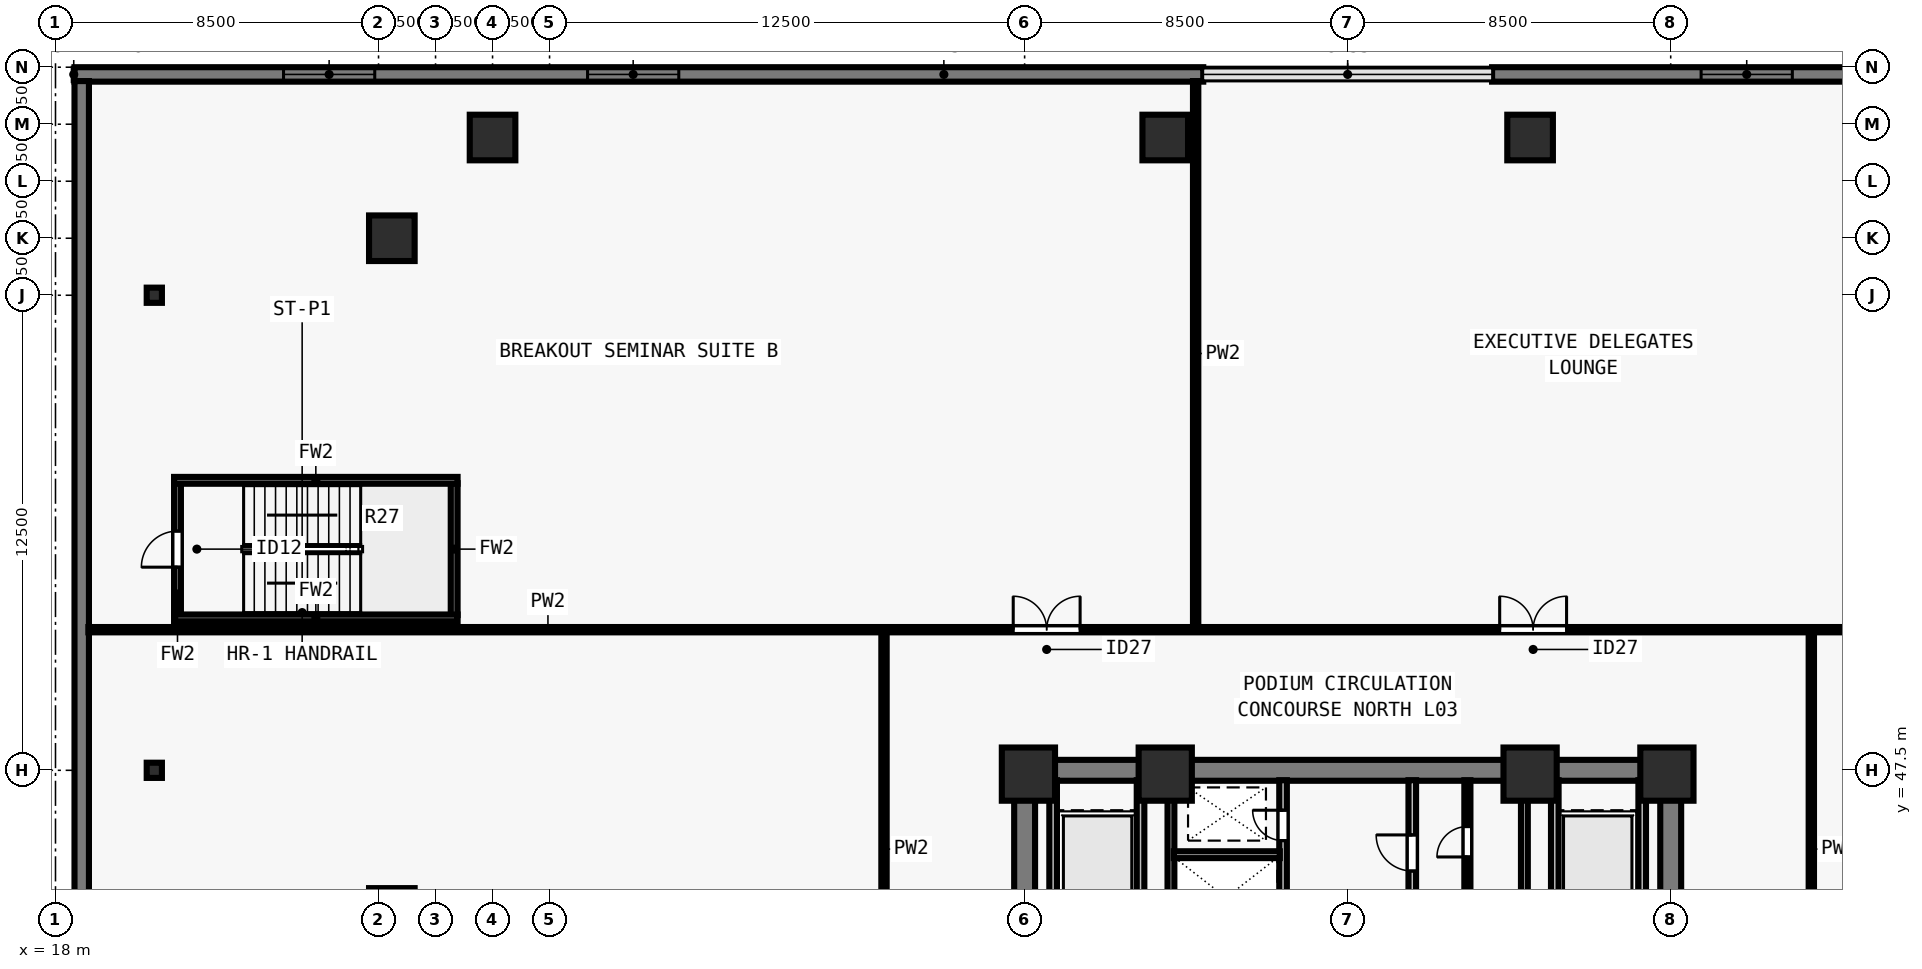
"""IFC4 building model, lengths in metres.
Left out: names, types, materials, properties, quantities, classifications, styles, units other than length and angle.
Written with IfcOpenShell. Run it as: python <this file> out.ifc"""

import sys

from ifc_helpers import new_model, si_unit, direction, frame, frame_2d, origin, origin_2d, place, context, subcontext, project, spatial, rectangle, i_section, extrude, element, fill, save


model = new_model("IFC4")
c1 = context("Model", 3, precision=1e-05, world=origin(), true_north=direction((0.0, 1.0)))
c2 = subcontext(c1, "Body", "Model", "MODEL_VIEW")
j1 = project(units=[si_unit("LENGTHUNIT", "METRE"), si_unit("PLANEANGLEUNIT", "RADIAN")], contexts=[c1])
p1 = place(None, origin())
s1 = spatial("IfcSite", under=j1, at=p1, CompositionType="ELEMENT")
p2 = place(p1, origin())
s2 = spatial("IfcBuilding", under=s1, at=p2, CompositionType="ELEMENT")
p3 = place(p2, frame((0.0, 0.0, 14.5)))
s3 = spatial("IfcBuildingStorey", under=s2, at=p3, CompositionType="ELEMENT", Elevation=14.5)
for number, where, z_axis, x_axis in (
    (1, (43.6, 47.4, 0.0), (0.0, 0.0, 1.0), (1.0, 0.0, 0.0)),
    (2, (47.2, 47.4, 0.0), (0.0, 0.0, 1.0), (1.0, 0.0, 0.0)),
    (3, (56.8, 47.4, 0.0), (0.0, 0.0, 1.0), (1.0, 0.0, 0.0)),
    (4, (60.4, 47.4, 0.0), (0.0, 0.0, 1.0), (1.0, 0.0, 0.0)),
):
    element("IfcColumn", number, at=place(p3, frame(where, z_axis=z_axis, x_axis=x_axis)), inside=s3, PredefinedType="COLUMN", context=c2, shape_type="SweptSolid", body=[
        extrude(rectangle(XDim=1.4, YDim=1.4, at=origin_2d()), origin(), (0.0, 0.0, 1.0), 4.5),
    ])
for number, where, z_axis, x_axis in (
    (5, (56.8, 64.15, 0.0), (0.0, 0.0, 1.0), (1.0, 0.0, 0.0)),
    (6, (47.2, 64.15, 0.0), (0.0, 0.0, 1.0), (1.0, 0.0, 0.0)),
    (7, (29.5, 64.15, 0.0), (0.0, 0.0, 1.0), (1.0, 0.0, 0.0)),
    (8, (26.85, 61.5, 0.0), (0.0, 0.0, 1.0), (1.0, 0.0, 0.0)),
    (9, (26.85, 43.8, 0.0), (0.0, 0.0, 1.0), (1.0, 0.0, 0.0)),
):
    element("IfcColumn", number, at=place(p3, frame(where, z_axis=z_axis, x_axis=x_axis)), inside=s3, PredefinedType="COLUMN", context=c2, shape_type="SweptSolid", body=[
        extrude(rectangle(XDim=1.2, YDim=1.2, at=origin_2d()), origin(), (0.0, 0.0, 1.0), 4.5),
    ])
for number, where, z_axis, x_axis in (
    (10, (20.6, 47.5, 0.0), (0.0, 0.0, 1.0), (1.0, 0.0, 0.0)),
    (11, (20.6, 60.0, 0.0), (0.0, 0.0, 1.0), (1.0, 0.0, 0.0)),
):
    element("IfcColumn", number, at=place(p3, frame(where, z_axis=z_axis, x_axis=x_axis)), inside=s3, PredefinedType="COLUMN", context=c2, shape_type="SweptSolid", body=[
        extrude(i_section(OverallWidth=0.4, OverallDepth=0.4, WebThickness=0.028, FlangeThickness=0.045, at=origin_2d()), origin(), (0.0, 0.0, 1.0), 4.5),
    ])
p4 = place(p3, frame((18.5, 65.81, 0.0), z_axis=(0.0, 0.0, 1.0), x_axis=(1.0, 0.0, 0.0)))
e12 = element("IfcWall", 12, at=p4, inside=s3, PredefinedType="SOLIDWALL", context=c2, shape_type="SweptSolid", body=[
    extrude(rectangle(XDim=29.7, YDim=0.38, at=frame_2d((14.85, 0.0))), origin(), (0.0, 0.0, 1.0), 4.15),
])
p5 = place(p4, frame((5.5, 0.0, 0.8)))
e13 = element("IfcOpeningElement", 13, at=p5, cuts=e12, PredefinedType="OPENING", context=c2, shape_type="SweptSolid", body=[
    extrude(rectangle(XDim=2.4, YDim=1.6, at=frame_2d((1.2, 0.8))), frame((0.0, 0.2, 0.0), z_axis=(0.0, -1.0, 0.0), x_axis=(1.0, 0.0, 0.0)), (0.0, 0.0, 1.0), 0.4),
])
p6 = place(p4, frame((13.5, 0.0, 0.8)))
e14 = element("IfcOpeningElement", 14, at=p6, cuts=e12, PredefinedType="OPENING", context=c2, shape_type="SweptSolid", body=[
    extrude(rectangle(XDim=2.4, YDim=1.6, at=frame_2d((1.2, 0.8))), frame((0.0, 0.2, 0.0), z_axis=(0.0, -1.0, 0.0), x_axis=(1.0, 0.0, 0.0)), (0.0, 0.0, 1.0), 0.4),
])
p7 = place(p3, frame((55.8, 65.81, 0.0), z_axis=(0.0, 0.0, 1.0), x_axis=(1.0, 0.0, 0.0)))
e15 = element("IfcWall", 15, at=p7, inside=s3, PredefinedType="SOLIDWALL", context=c2, shape_type="SweptSolid", body=[
    extrude(rectangle(XDim=29.7, YDim=0.38, at=frame_2d((14.85, 0.0))), origin(), (0.0, 0.0, 1.0), 4.15),
])
p8 = place(p7, frame((5.5, 0.0, 0.8)))
e16 = element("IfcOpeningElement", 16, at=p8, cuts=e15, PredefinedType="OPENING", context=c2, shape_type="SweptSolid", body=[
    extrude(rectangle(XDim=2.4, YDim=1.6, at=frame_2d((1.2, 0.8))), frame((0.0, 0.2, 0.0), z_axis=(0.0, -1.0, 0.0), x_axis=(1.0, 0.0, 0.0)), (0.0, 0.0, 1.0), 0.4),
])
p9 = place(p7, frame((13.5, 0.0, 0.8)))
e17 = element("IfcOpeningElement", 17, at=p9, cuts=e15, PredefinedType="OPENING", context=c2, shape_type="SweptSolid", body=[
    extrude(rectangle(XDim=2.4, YDim=1.6, at=frame_2d((1.2, 0.8))), frame((0.0, 0.2, 0.0), z_axis=(0.0, -1.0, 0.0), x_axis=(1.0, 0.0, 0.0)), (0.0, 0.0, 1.0), 0.4),
])
p10 = place(p3, frame((18.69, 12.365, 0.0), z_axis=(0.0, 0.0, 1.0), x_axis=(0.0, 1.0, 0.0)))
e18 = element("IfcWall", 18, at=p10, inside=s3, PredefinedType="SOLIDWALL", context=c2, shape_type="SweptSolid", body=[
    extrude(rectangle(XDim=53.27, YDim=0.38, at=frame_2d((26.635, 0.0))), origin(), (0.0, 0.0, 1.0), 4.15),
])
p11 = place(p3, frame((43.225, 47.5, 0.0), z_axis=(0.0, 0.0, 1.0), x_axis=(1.0, 0.0, 0.0)))
e19 = element("IfcWall", 19, at=p11, inside=s3, PredefinedType="SHEAR", context=c2, shape_type="SweptSolid", body=[
    extrude(rectangle(XDim=17.55, YDim=0.55, at=frame_2d((8.775, 0.0))), origin(), (0.0, 0.0, 1.0), 4.15),
])
for number, where, z_axis, x_axis in (
    (20, (43.5, 40.8, 0.0), (0.0, 0.0, 1.0), (0.0, 1.0, 0.0)),
    (21, (60.5, 40.8, 0.0), (0.0, 0.0, 1.0), (0.0, 1.0, 0.0)),
):
    element("IfcWall", number, at=place(p3, frame(where, z_axis=z_axis, x_axis=x_axis)), inside=s3, PredefinedType="SHEAR", context=c2, shape_type="SweptSolid", body=[
        extrude(rectangle(XDim=6.435, YDim=0.55, at=frame_2d((3.218, 0.0))), origin(), (0.0, 0.0, 1.0), 4.15),
    ])
p12 = place(p3, frame((50.3, 40.585, 0.0), z_axis=(0.0, 0.0, 1.0), x_axis=(0.0, 1.0, 0.0)))
e22 = element("IfcWall", 22, at=p12, inside=s3, PredefinedType="SOLIDWALL", context=c2, shape_type="SweptSolid", body=[
    extrude(rectangle(XDim=6.655, YDim=0.2, at=frame_2d((3.328, 0.0))), origin(), (0.0, 0.0, 1.0), 4.15),
])
p13 = place(p12, frame((5.065, 0.0, 0.0)))
e23 = element("IfcOpeningElement", 23, at=p13, cuts=e22, PredefinedType="OPENING", context=c2, shape_type="SweptSolid", body=[
    extrude(rectangle(XDim=0.8, YDim=2.08, at=frame_2d((0.4, 1.04))), frame((0.0, 0.11, 0.0), z_axis=(0.0, -1.0, 0.0), x_axis=(1.0, 0.0, 0.0)), (0.0, 0.0, 1.0), 0.22),
])
p14 = place(p3, frame((53.7, 40.585, 0.0), z_axis=(0.0, 0.0, 1.0), x_axis=(0.0, 1.0, 0.0)))
e24 = element("IfcWall", 24, at=p14, inside=s3, PredefinedType="SOLIDWALL", context=c2, shape_type="SweptSolid", body=[
    extrude(rectangle(XDim=6.655, YDim=0.2, at=frame_2d((3.328, 0.0))), origin(), (0.0, 0.0, 1.0), 4.15),
])
p15 = place(p14, frame((0.195, 0.0, 0.0)))
e25 = element("IfcOpeningElement", 25, at=p15, cuts=e24, PredefinedType="OPENING", context=c2, shape_type="SweptSolid", body=[
    extrude(rectangle(XDim=0.8, YDim=2.08, at=frame_2d((0.4, 1.04))), frame((0.0, 0.11, 0.0), z_axis=(0.0, -1.0, 0.0), x_axis=(1.0, 0.0, 0.0)), (0.0, 0.0, 1.0), 0.22),
])
p16 = place(p14, frame((4.265, 0.0, 0.0)))
e26 = element("IfcOpeningElement", 26, at=p16, cuts=e24, PredefinedType="OPENING", context=c2, shape_type="SweptSolid", body=[
    extrude(rectangle(XDim=0.95, YDim=2.12, at=frame_2d((0.475, 1.06))), frame((0.0, 0.11, 0.0), z_axis=(0.0, -1.0, 0.0), x_axis=(1.0, 0.0, 0.0)), (0.0, 0.0, 1.0), 0.22),
])
for number, where, z_axis, x_axis in (
    (27, (46.55, 43.735, 0.0), (0.0, 0.0, 1.0), (0.0, 1.0, 0.0)),
    (28, (44.25, 43.735, 0.0), (0.0, 0.0, 1.0), (0.0, 1.0, 0.0)),
    (29, (57.45, 43.735, 0.0), (0.0, 0.0, 1.0), (0.0, 1.0, 0.0)),
    (30, (59.75, 43.735, 0.0), (0.0, 0.0, 1.0), (0.0, 1.0, 0.0)),
):
    element("IfcWall", number, at=place(p3, frame(where, z_axis=z_axis, x_axis=x_axis)), inside=s3, PredefinedType="SOLIDWALL", context=c2, shape_type="SweptSolid", body=[
        extrude(rectangle(XDim=3.505, YDim=0.2, at=frame_2d((1.752, 0.0))), origin(), (0.0, 0.0, 1.0), 4.15),
    ])
p17 = place(p3, frame((47.35, 43.735, 0.0), z_axis=(0.0, 0.0, 1.0), x_axis=(0.0, 1.0, 0.0)))
e31 = element("IfcWall", 31, at=p17, inside=s3, PredefinedType="SOLIDWALL", context=c2, shape_type="SweptSolid", body=[
    extrude(rectangle(XDim=3.505, YDim=0.18, at=frame_2d((1.752, 0.0))), origin(), (0.0, 0.0, 1.0), 4.15),
])
p18 = place(p3, frame((47.425, 45.28, 0.0), z_axis=(0.0, 0.0, 1.0), x_axis=(1.0, 0.0, 0.0)))
e32 = element("IfcWall", 32, at=p18, inside=s3, PredefinedType="SOLIDWALL", context=c2, shape_type="SweptSolid", body=[
    extrude(rectangle(XDim=2.79, YDim=0.18, at=frame_2d((1.395, 0.0))), origin(), (0.0, 0.0, 1.0), 4.15),
])
p19 = place(p3, frame((56.65, 43.735, 0.0), z_axis=(0.0, 0.0, 1.0), x_axis=(0.0, 1.0, 0.0)))
e33 = element("IfcWall", 33, at=p19, inside=s3, PredefinedType="SOLIDWALL", context=c2, shape_type="SweptSolid", body=[
    extrude(rectangle(XDim=3.505, YDim=0.18, at=frame_2d((1.752, 0.0))), origin(), (0.0, 0.0, 1.0), 4.15),
])
p20 = place(p3, frame((55.15, 44.195, 0.0), z_axis=(0.0, 0.0, 1.0), x_axis=(0.0, 1.0, 0.0)))
e34 = element("IfcWall", 34, at=p20, inside=s3, PredefinedType="PARTITIONING", context=c2, shape_type="SweptSolid", body=[
    extrude(rectangle(XDim=3.045, YDim=0.16, at=frame_2d((1.522, 0.0))), origin(), (0.0, 0.0, 1.0), 4.15),
])
p21 = place(p20, frame((1.025, 0.0, 0.0)))
e35 = element("IfcOpeningElement", 35, at=p21, cuts=e34, PredefinedType="OPENING", context=c2, shape_type="SweptSolid", body=[
    extrude(rectangle(XDim=0.8, YDim=2.1, at=frame_2d((0.4, 1.05))), frame((0.0, 0.09, 0.0), z_axis=(0.0, -1.0, 0.0), x_axis=(1.0, 0.0, 0.0)), (0.0, 0.0, 1.0), 0.18),
])
p22 = place(p3, frame((18.865, 51.2, 0.0), z_axis=(0.0, 0.0, 1.0), x_axis=(1.0, 0.0, 0.0)))
e36 = element("IfcWall", 36, at=p22, inside=s3, PredefinedType="PARTITIONING", context=c2, shape_type="SweptSolid", body=[
    extrude(rectangle(XDim=66.27, YDim=0.14, at=frame_2d((33.135, 0.0))), origin(), (0.0, 0.0, 1.0), 3.668),
])
p23 = place(p22, frame((24.335, 0.0, 0.0)))
e37 = element("IfcOpeningElement", 37, at=p23, cuts=e36, PredefinedType="OPENING", context=c2, shape_type="SweptSolid", body=[
    extrude(rectangle(XDim=1.76, YDim=2.2, at=frame_2d((0.88, 1.1))), frame((0.0, 0.08, 0.0), z_axis=(0.0, -1.0, 0.0), x_axis=(1.0, 0.0, 0.0)), (0.0, 0.0, 1.0), 0.16),
])
p24 = place(p22, frame((37.135, 0.0, 0.0)))
e38 = element("IfcOpeningElement", 38, at=p24, cuts=e36, PredefinedType="OPENING", context=c2, shape_type="SweptSolid", body=[
    extrude(rectangle(XDim=1.76, YDim=2.2, at=frame_2d((0.88, 1.1))), frame((0.0, 0.08, 0.0), z_axis=(0.0, -1.0, 0.0), x_axis=(1.0, 0.0, 0.0)), (0.0, 0.0, 1.0), 0.16),
])
p25 = place(p22, frame((51.135, 0.0, 0.0)))
e39 = element("IfcOpeningElement", 39, at=p25, cuts=e36, PredefinedType="OPENING", context=c2, shape_type="SweptSolid", body=[
    extrude(rectangle(XDim=0.95, YDim=2.1, at=frame_2d((0.475, 1.05))), frame((0.0, 0.08, 0.0), z_axis=(0.0, -1.0, 0.0), x_axis=(1.0, 0.0, 0.0)), (0.0, 0.0, 1.0), 0.16),
])
p26 = place(p22, frame((55.335, 0.0, 0.0)))
e40 = element("IfcOpeningElement", 40, at=p26, cuts=e36, PredefinedType="OPENING", context=c2, shape_type="SweptSolid", body=[
    extrude(rectangle(XDim=1.76, YDim=2.2, at=frame_2d((0.88, 1.1))), frame((0.0, 0.08, 0.0), z_axis=(0.0, -1.0, 0.0), x_axis=(1.0, 0.0, 0.0)), (0.0, 0.0, 1.0), 0.16),
])
p27 = place(p3, frame((39.8, 26.855, 0.0), z_axis=(0.0, 0.0, 1.0), x_axis=(0.0, 1.0, 0.0)))
e41 = element("IfcWall", 41, at=p27, inside=s3, PredefinedType="PARTITIONING", context=c2, shape_type="SweptSolid", body=[
    extrude(rectangle(XDim=24.29, YDim=0.14, at=frame_2d((12.145, 0.0))), origin(), (0.0, 0.0, 1.0), 4.15),
])
p28 = place(p27, frame((10.945, 0.0, 0.0)))
e42 = element("IfcOpeningElement", 42, at=p28, cuts=e41, PredefinedType="OPENING", context=c2, shape_type="SweptSolid", body=[
    extrude(rectangle(XDim=1.76, YDim=2.2, at=frame_2d((0.88, 1.1))), frame((0.0, 0.08, 0.0), z_axis=(0.0, -1.0, 0.0), x_axis=(1.0, 0.0, 0.0)), (0.0, 0.0, 1.0), 0.16),
])
p29 = place(p3, frame((64.2, 26.855, 0.0), z_axis=(0.0, 0.0, 1.0), x_axis=(0.0, 1.0, 0.0)))
e43 = element("IfcWall", 43, at=p29, inside=s3, PredefinedType="PARTITIONING", context=c2, shape_type="SweptSolid", body=[
    extrude(rectangle(XDim=24.29, YDim=0.14, at=frame_2d((12.145, 0.0))), origin(), (0.0, 0.0, 1.0), 4.15),
])
p30 = place(p29, frame((10.945, 0.0, 0.0)))
e44 = element("IfcOpeningElement", 44, at=p30, cuts=e43, PredefinedType="OPENING", context=c2, shape_type="SweptSolid", body=[
    extrude(rectangle(XDim=1.76, YDim=2.2, at=frame_2d((0.88, 1.1))), frame((0.0, 0.08, 0.0), z_axis=(0.0, -1.0, 0.0), x_axis=(1.0, 0.0, 0.0)), (0.0, 0.0, 1.0), 0.16),
])
p31 = place(p3, frame((48.0, 51.3, 0.0), z_axis=(0.0, 0.0, 1.0), x_axis=(0.0, 1.0, 0.0)))
e45 = element("IfcWall", 45, at=p31, inside=s3, PredefinedType="PARTITIONING", context=c2, shape_type="SweptSolid", body=[
    extrude(rectangle(XDim=14.335, YDim=0.14, at=frame_2d((7.167, 0.0))), origin(), (0.0, 0.0, 1.0), 4.15),
])
p32 = place(p3, frame((21.21, 51.585, 0.0), z_axis=(0.0, 0.0, 1.0), x_axis=(0.0, 1.0, 0.0)))
e46 = element("IfcWall", 46, at=p32, inside=s3, PredefinedType="SOLIDWALL", context=c2, shape_type="SweptSolid", body=[
    extrude(rectangle(XDim=3.47, YDim=0.18, at=frame_2d((1.735, 0.0))), origin(), (0.0, 0.0, 1.0), 4.15),
])
p33 = place(p32, frame((1.26, 0.0, 0.0)))
e47 = element("IfcOpeningElement", 47, at=p33, cuts=e46, PredefinedType="OPENING", context=c2, shape_type="SweptSolid", body=[
    extrude(rectangle(XDim=0.95, YDim=2.15, at=frame_2d((0.475, 1.075))), frame((0.0, 0.1, 0.0), z_axis=(0.0, -1.0, 0.0), x_axis=(1.0, 0.0, 0.0)), (0.0, 0.0, 1.0), 0.2),
])
p34 = place(p3, frame((28.49, 51.585, 0.0), z_axis=(0.0, 0.0, 1.0), x_axis=(0.0, 1.0, 0.0)))
e48 = element("IfcWall", 48, at=p34, inside=s3, PredefinedType="SOLIDWALL", context=c2, shape_type="SweptSolid", body=[
    extrude(rectangle(XDim=3.47, YDim=0.18, at=frame_2d((1.735, 0.0))), origin(), (0.0, 0.0, 1.0), 4.15),
])
for number, where, z_axis, x_axis in (
    (49, (21.12, 51.51, 0.0), (0.0, 0.0, 1.0), (1.0, 0.0, 0.0)),
    (50, (21.12, 55.13, 0.0), (0.0, 0.0, 1.0), (1.0, 0.0, 0.0)),
):
    element("IfcWall", number, at=place(p3, frame(where, z_axis=z_axis, x_axis=x_axis)), inside=s3, PredefinedType="SOLIDWALL", context=c2, shape_type="SweptSolid", body=[
        extrude(rectangle(XDim=7.46, YDim=0.18, at=frame_2d((3.73, 0.0))), origin(), (0.0, 0.0, 1.0), 4.15),
    ])
p35 = place(p5, origin())
e51 = element("IfcWindow", 51, at=p35, inside=s3, PartitioningType="SINGLE_PANEL", PredefinedType="WINDOW", context=c2, shape_type="SweptSolid", body=[
    extrude(rectangle(XDim=2.4, YDim=1.6, at=frame_2d((1.2, 0.8))), frame((0.0, -0.05, 0.0), z_axis=(0.0, -1.0, 0.0), x_axis=(1.0, 0.0, 0.0)), (0.0, 0.0, 1.0), 0.06),
])
fill(e13, e51)
p36 = place(p6, origin())
e52 = element("IfcWindow", 52, at=p36, inside=s3, PartitioningType="SINGLE_PANEL", PredefinedType="WINDOW", context=c2, shape_type="SweptSolid", body=[
    extrude(rectangle(XDim=2.4, YDim=1.6, at=frame_2d((1.2, 0.8))), frame((0.0, -0.05, 0.0), z_axis=(0.0, -1.0, 0.0), x_axis=(1.0, 0.0, 0.0)), (0.0, 0.0, 1.0), 0.06),
])
fill(e14, e52)
p37 = place(p8, origin())
e53 = element("IfcWindow", 53, at=p37, inside=s3, PartitioningType="SINGLE_PANEL", PredefinedType="WINDOW", context=c2, shape_type="SweptSolid", body=[
    extrude(rectangle(XDim=2.4, YDim=1.6, at=frame_2d((1.2, 0.8))), frame((0.0, -0.05, 0.0), z_axis=(0.0, -1.0, 0.0), x_axis=(1.0, 0.0, 0.0)), (0.0, 0.0, 1.0), 0.06),
])
fill(e16, e53)
p38 = place(p13, origin())
e54 = element("IfcDoor", 54, at=p38, inside=s3, OperationType="SINGLE_SWING_RIGHT", PredefinedType="DOOR", context=c2, shape_type="SweptSolid", body=[
    extrude(rectangle(XDim=0.8, YDim=2.08, at=frame_2d((0.4, 1.04))), frame((0.0, 0.025, 0.0), z_axis=(0.0, -1.0, 0.0), x_axis=(1.0, 0.0, 0.0)), (0.0, 0.0, 1.0), 0.05),
])
fill(e23, e54)
p39 = place(p16, origin())
e55 = element("IfcDoor", 55, at=p39, inside=s3, OperationType="SINGLE_SWING_RIGHT", PredefinedType="DOOR", context=c2, shape_type="SweptSolid", body=[
    extrude(rectangle(XDim=0.95, YDim=2.12, at=frame_2d((0.475, 1.06))), frame((0.0, 0.025, 0.0), z_axis=(0.0, -1.0, 0.0), x_axis=(1.0, 0.0, 0.0)), (0.0, 0.0, 1.0), 0.05),
])
fill(e26, e55)
p40 = place(p21, origin())
e56 = element("IfcDoor", 56, at=p40, inside=s3, OperationType="SINGLE_SWING_LEFT", PredefinedType="DOOR", context=c2, shape_type="SweptSolid", body=[
    extrude(rectangle(XDim=0.8, YDim=2.1, at=frame_2d((0.4, 1.05))), frame((0.0, 0.025, 0.0), z_axis=(0.0, -1.0, 0.0), x_axis=(1.0, 0.0, 0.0)), (0.0, 0.0, 1.0), 0.05),
])
fill(e35, e56)
p41 = place(p23, origin())
e57 = element("IfcDoor", 57, at=p41, inside=s3, OperationType="DOUBLE_DOOR_SINGLE_SWING", PredefinedType="DOOR", context=c2, shape_type="SweptSolid", body=[
    extrude(rectangle(XDim=1.76, YDim=2.2, at=frame_2d((0.88, 1.1))), frame((0.0, 0.025, 0.0), z_axis=(0.0, -1.0, 0.0), x_axis=(1.0, 0.0, 0.0)), (0.0, 0.0, 1.0), 0.05),
])
fill(e37, e57)
p42 = place(p24, origin())
e58 = element("IfcDoor", 58, at=p42, inside=s3, OperationType="DOUBLE_DOOR_SINGLE_SWING", PredefinedType="DOOR", context=c2, shape_type="SweptSolid", body=[
    extrude(rectangle(XDim=1.76, YDim=2.2, at=frame_2d((0.88, 1.1))), frame((0.0, 0.025, 0.0), z_axis=(0.0, -1.0, 0.0), x_axis=(1.0, 0.0, 0.0)), (0.0, 0.0, 1.0), 0.05),
])
fill(e38, e58)
p43 = place(p33, origin())
e59 = element("IfcDoor", 59, at=p43, inside=s3, OperationType="SINGLE_SWING_LEFT", PredefinedType="DOOR", context=c2, shape_type="SweptSolid", body=[
    extrude(rectangle(XDim=0.95, YDim=2.15, at=frame_2d((0.475, 1.075))), frame((0.0, 0.025, 0.0), z_axis=(0.0, -1.0, 0.0), x_axis=(1.0, 0.0, 0.0)), (0.0, 0.0, 1.0), 0.05),
])
fill(e47, e59)
save(model, sys.argv[1])
